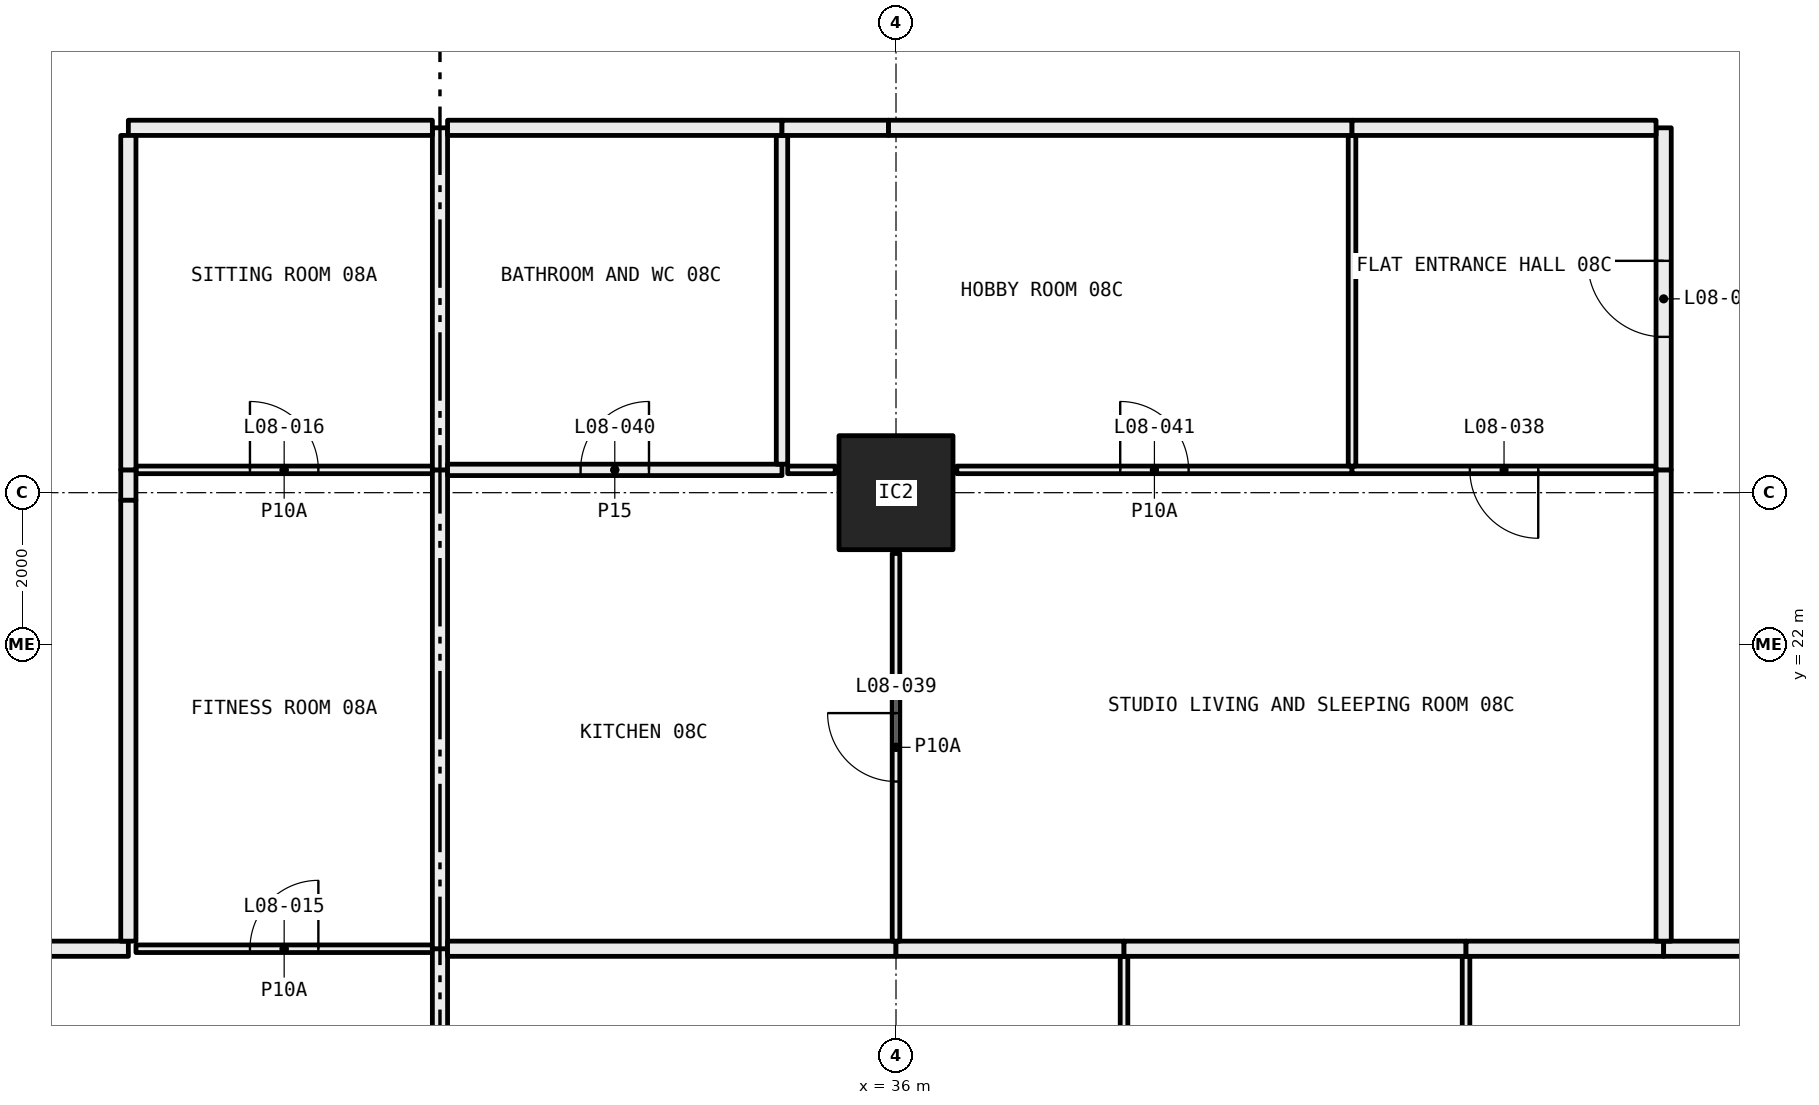
"""IFC4 building model, lengths in metres.
Left out: names, types, materials, properties, quantities, classifications, styles, units other than length and angle.
Written with IfcOpenShell. Run it as: python <this file> out.ifc"""

import sys

from ifc_helpers import new_model, si_unit, direction, frame, frame_2d, origin, origin_2d, place, context, subcontext, project, spatial, rectangle, hollow_rectangle, extrude, element, fill, save


model = new_model("IFC4")
c1 = context("Model", 3, precision=1e-05, world=origin(), true_north=direction((0.0, 1.0)))
c2 = subcontext(c1, "Body", "Model", "MODEL_VIEW")
j1 = project(units=[si_unit("LENGTHUNIT", "METRE"), si_unit("PLANEANGLEUNIT", "RADIAN")], contexts=[c1])
p1 = place(None, origin())
s1 = spatial("IfcSite", under=j1, at=p1, CompositionType="ELEMENT")
p2 = place(p1, origin())
s2 = spatial("IfcBuilding", under=s1, at=p2, CompositionType="ELEMENT")
p3 = place(p2, frame((0.0, 0.0, 40.35)))
s3 = spatial("IfcBuildingStorey", under=s2, at=p3, CompositionType="ELEMENT", Elevation=40.35)
p4 = place(p3, frame((36.0, 24.0, 0.0), z_axis=(0.0, 0.0, 1.0), x_axis=(1.0, 0.0, 0.0)))
e1 = element("IfcColumn", 1, at=p4, inside=s3, PredefinedType="COLUMN", context=c2, shape_type="SweptSolid", body=[
    extrude(hollow_rectangle(XDim=1.5, YDim=1.5, WallThickness=0.065, at=origin_2d()), origin(), (0.0, 0.0, 1.0), 3.05),
])
p5 = place(p3, frame((29.9, 18.0, 0.0), z_axis=(0.0, 0.0, 1.0), x_axis=(-1.0, 0.0, 0.0)))
e2 = element("IfcWall", 2, at=p5, inside=s3, PredefinedType="PARTITIONING", context=c2, shape_type="SweptSolid", body=[
    extrude(rectangle(XDim=3.9, YDim=0.1, at=frame_2d((1.95, 0.0))), origin(), (0.0, 0.0, 1.0), 3.05),
])
p6 = place(p5, frame((1.5, 0.0, 0.0)))
e3 = element("IfcOpeningElement", 3, at=p6, cuts=e2, PredefinedType="OPENING", context=c2, shape_type="SweptSolid", body=[
    extrude(rectangle(XDim=0.9, YDim=2.1, at=frame_2d((0.45, 1.05))), frame((0.0, 0.06, 0.0), z_axis=(0.0, -1.0, 0.0), x_axis=(1.0, 0.0, 0.0)), (0.0, 0.0, 1.0), 0.12),
])
p7 = place(p3, frame((30.0, 12.0, 0.0), z_axis=(0.0, 0.0, 1.0), x_axis=(0.0, 1.0, 0.0)))
e4 = element("IfcWall", 4, at=p7, inside=s3, PredefinedType="PARTITIONING", context=c2, shape_type="SweptSolid", body=[
    extrude(rectangle(XDim=6.0, YDim=0.2, at=frame_2d((3.0, 0.0))), origin(), (0.0, 0.0, 1.0), 2.45),
])
p8 = place(p3, frame((25.9, 18.0, 0.0), z_axis=(0.0, 0.0, 1.0), x_axis=(-1.0, 0.0, 0.0)))
e5 = element("IfcWall", 5, at=p8, inside=s3, PredefinedType="PARTITIONING", context=c2, shape_type="SweptSolid", body=[
    extrude(rectangle(XDim=1.9, YDim=0.2, at=frame_2d((0.95, 0.0))), origin(), (0.0, 0.0, 1.0), 3.05),
])
p9 = place(p3, frame((29.9, 24.3, 0.0), z_axis=(0.0, 0.0, 1.0), x_axis=(-1.0, 0.0, 0.0)))
e6 = element("IfcWall", 6, at=p9, inside=s3, PredefinedType="PARTITIONING", context=c2, shape_type="SweptSolid", body=[
    extrude(rectangle(XDim=3.9, YDim=0.1, at=frame_2d((1.95, 0.0))), origin(), (0.0, 0.0, 1.0), 3.05),
])
p10 = place(p9, frame((1.5, 0.0, 0.0)))
e7 = element("IfcOpeningElement", 7, at=p10, cuts=e6, PredefinedType="OPENING", context=c2, shape_type="SweptSolid", body=[
    extrude(rectangle(XDim=0.9, YDim=2.1, at=frame_2d((0.45, 1.05))), frame((0.0, 0.06, 0.0), z_axis=(0.0, -1.0, 0.0), x_axis=(1.0, 0.0, 0.0)), (0.0, 0.0, 1.0), 0.12),
])
p11 = place(p3, frame((30.0, 18.0, 0.0), z_axis=(0.0, 0.0, 1.0), x_axis=(0.0, 1.0, 0.0)))
e8 = element("IfcWall", 8, at=p11, inside=s3, PredefinedType="PARTITIONING", context=c2, shape_type="SweptSolid", body=[
    extrude(rectangle(XDim=6.3, YDim=0.2, at=frame_2d((3.15, 0.0))), origin(), (0.0, 0.0, 1.0), 2.45),
])
p12 = place(p3, frame((25.9, 24.3, 0.0), z_axis=(0.0, 0.0, 1.0), x_axis=(0.0, -1.0, 0.0)))
e9 = element("IfcWall", 9, at=p12, inside=s3, PredefinedType="PARTITIONING", context=c2, shape_type="SweptSolid", body=[
    extrude(rectangle(XDim=0.4, YDim=0.2, at=frame_2d((0.2, 0.0))), origin(), (0.0, 0.0, 1.0), 2.45),
])
p13 = place(p3, frame((25.9, 23.9, 0.0), z_axis=(0.0, 0.0, 1.0), x_axis=(0.0, -1.0, 0.0)))
e10 = element("IfcWall", 10, at=p13, inside=s3, PredefinedType="PARTITIONING", context=c2, shape_type="SweptSolid", body=[
    extrude(rectangle(XDim=5.8, YDim=0.2, at=frame_2d((2.9, 0.0))), origin(), (0.0, 0.0, 1.0), 3.05),
])
p14 = place(p3, frame((30.0, 24.3, 0.0), z_axis=(0.0, 0.0, 1.0), x_axis=(0.0, 1.0, 0.0)))
e11 = element("IfcWall", 11, at=p14, inside=s3, PredefinedType="PARTITIONING", context=c2, shape_type="SweptSolid", body=[
    extrude(rectangle(XDim=4.5, YDim=0.2, at=frame_2d((2.25, 0.0))), origin(), (0.0, 0.0, 1.0), 3.05),
])
p15 = place(p3, frame((29.9, 28.8, 0.0), z_axis=(0.0, 0.0, 1.0), x_axis=(-1.0, 0.0, 0.0)))
e12 = element("IfcWall", 12, at=p15, inside=s3, PredefinedType="PARTITIONING", context=c2, shape_type="SweptSolid", body=[
    extrude(rectangle(XDim=4.0, YDim=0.2, at=frame_2d((2.0, 0.0))), origin(), (0.0, 0.0, 1.0), 3.05),
])
p16 = place(p3, frame((25.9, 28.7, 0.0), z_axis=(0.0, 0.0, 1.0), x_axis=(0.0, -1.0, 0.0)))
e13 = element("IfcWall", 13, at=p16, inside=s3, PredefinedType="PARTITIONING", context=c2, shape_type="SweptSolid", body=[
    extrude(rectangle(XDim=4.4, YDim=0.2, at=frame_2d((2.2, 0.0))), origin(), (0.0, 0.0, 1.0), 3.05),
])
p17 = place(p3, frame((39.0, 12.05, 0.0), z_axis=(0.0, 0.0, 1.0), x_axis=(0.0, 1.0, 0.0)))
e14 = element("IfcWall", 14, at=p17, inside=s3, PredefinedType="PARTITIONING", context=c2, shape_type="SweptSolid", body=[
    extrude(rectangle(XDim=5.85, YDim=0.1, at=frame_2d((2.925, 0.0))), origin(), (0.0, 0.0, 1.0), 2.45),
])
p18 = place(p3, frame((36.0, 18.0, 0.0), z_axis=(0.0, 0.0, 1.0), x_axis=(-1.0, 0.0, 0.0)))
e15 = element("IfcWall", 15, at=p18, inside=s3, PredefinedType="PARTITIONING", context=c2, shape_type="SweptSolid", body=[
    extrude(rectangle(XDim=5.9, YDim=0.2, at=frame_2d((2.95, 0.0))), origin(), (0.0, 0.0, 1.0), 2.45),
])
p19 = place(p3, frame((39.0, 18.0, 0.0), z_axis=(0.0, 0.0, 1.0), x_axis=(-1.0, 0.0, 0.0)))
e16 = element("IfcWall", 16, at=p19, inside=s3, PredefinedType="PARTITIONING", context=c2, shape_type="SweptSolid", body=[
    extrude(rectangle(XDim=3.0, YDim=0.2, at=frame_2d((1.5, 0.0))), origin(), (0.0, 0.0, 1.0), 2.45),
])
p20 = place(p3, frame((43.5, 12.05, 0.0), z_axis=(0.0, 0.0, 1.0), x_axis=(0.0, 1.0, 0.0)))
e17 = element("IfcWall", 17, at=p20, inside=s3, PredefinedType="PARTITIONING", context=c2, shape_type="SweptSolid", body=[
    extrude(rectangle(XDim=5.85, YDim=0.1, at=frame_2d((2.925, 0.0))), origin(), (0.0, 0.0, 1.0), 2.45),
])
p21 = place(p3, frame((43.5, 18.0, 0.0), z_axis=(0.0, 0.0, 1.0), x_axis=(-1.0, 0.0, 0.0)))
e18 = element("IfcWall", 18, at=p21, inside=s3, PredefinedType="PARTITIONING", context=c2, shape_type="SweptSolid", body=[
    extrude(rectangle(XDim=4.5, YDim=0.2, at=frame_2d((2.25, 0.0))), origin(), (0.0, 0.0, 1.0), 3.05),
])
p22 = place(p3, frame((46.1, 18.0, 0.0), z_axis=(0.0, 0.0, 1.0), x_axis=(-1.0, 0.0, 0.0)))
e19 = element("IfcWall", 19, at=p22, inside=s3, PredefinedType="PARTITIONING", context=c2, shape_type="SweptSolid", body=[
    extrude(rectangle(XDim=2.6, YDim=0.2, at=frame_2d((1.3, 0.0))), origin(), (0.0, 0.0, 1.0), 3.05),
])
p23 = place(p3, frame((48.0, 18.0, 0.0), z_axis=(0.0, 0.0, 1.0), x_axis=(-1.0, 0.0, 0.0)))
e20 = element("IfcWall", 20, at=p23, inside=s3, PredefinedType="PARTITIONING", context=c2, shape_type="SweptSolid", body=[
    extrude(rectangle(XDim=1.9, YDim=0.2, at=frame_2d((0.95, 0.0))), origin(), (0.0, 0.0, 1.0), 3.05),
])
p24 = place(p3, frame((36.0, 18.1, 0.0), z_axis=(0.0, 0.0, 1.0), x_axis=(0.0, 1.0, 0.0)))
e21 = element("IfcWall", 21, at=p24, inside=s3, PredefinedType="PARTITIONING", context=c2, shape_type="SweptSolid", body=[
    extrude(rectangle(XDim=5.1, YDim=0.1, at=frame_2d((2.55, 0.0))), origin(), (0.0, 0.0, 1.0), 2.45),
])
p25 = place(p24, frame((2.1, 0.0, 0.0)))
e22 = element("IfcOpeningElement", 22, at=p25, cuts=e21, PredefinedType="OPENING", context=c2, shape_type="SweptSolid", body=[
    extrude(rectangle(XDim=0.9, YDim=2.1, at=frame_2d((0.45, 1.05))), frame((0.0, 0.06, 0.0), z_axis=(0.0, -1.0, 0.0), x_axis=(1.0, 0.0, 0.0)), (0.0, 0.0, 1.0), 0.12),
])
p26 = place(p3, frame((34.5, 24.3, 0.0), z_axis=(0.0, 0.0, 1.0), x_axis=(-1.0, 0.0, 0.0)))
e23 = element("IfcWall", 23, at=p26, inside=s3, PredefinedType="PARTITIONING", context=c2, shape_type="SweptSolid", body=[
    extrude(rectangle(XDim=4.4, YDim=0.15, at=frame_2d((2.2, 0.0))), origin(), (0.0, 0.0, 1.0), 3.05),
])
p27 = place(p26, frame((1.75, 0.0, 0.0)))
e24 = element("IfcOpeningElement", 24, at=p27, cuts=e23, PredefinedType="OPENING", context=c2, shape_type="SweptSolid", body=[
    extrude(rectangle(XDim=0.9, YDim=2.1, at=frame_2d((0.45, 1.05))), frame((0.0, 0.085, 0.0), z_axis=(0.0, -1.0, 0.0), x_axis=(1.0, 0.0, 0.0)), (0.0, 0.0, 1.0), 0.17),
])
p28 = place(p3, frame((35.2, 24.3, 0.0), z_axis=(0.0, 0.0, 1.0), x_axis=(-1.0, 0.0, 0.0)))
e25 = element("IfcWall", 25, at=p28, inside=s3, PredefinedType="PARTITIONING", context=c2, shape_type="SweptSolid", body=[
    extrude(rectangle(XDim=0.625, YDim=0.1, at=frame_2d((0.312, 0.0))), origin(), (0.0, 0.0, 1.0), 3.05),
])
p29 = place(p3, frame((42.0, 24.3, 0.0), z_axis=(0.0, 0.0, 1.0), x_axis=(-1.0, 0.0, 0.0)))
e26 = element("IfcWall", 26, at=p29, inside=s3, PredefinedType="PARTITIONING", context=c2, shape_type="SweptSolid", body=[
    extrude(rectangle(XDim=5.2, YDim=0.1, at=frame_2d((2.6, 0.0))), origin(), (0.0, 0.0, 1.0), 3.05),
])
p30 = place(p29, frame((2.15, 0.0, 0.0)))
e27 = element("IfcOpeningElement", 27, at=p30, cuts=e26, PredefinedType="OPENING", context=c2, shape_type="SweptSolid", body=[
    extrude(rectangle(XDim=0.9, YDim=2.1, at=frame_2d((0.45, 1.05))), frame((0.0, 0.06, 0.0), z_axis=(0.0, -1.0, 0.0), x_axis=(1.0, 0.0, 0.0)), (0.0, 0.0, 1.0), 0.12),
])
p31 = place(p3, frame((46.0, 24.3, 0.0), z_axis=(0.0, 0.0, 1.0), x_axis=(-1.0, 0.0, 0.0)))
e28 = element("IfcWall", 28, at=p31, inside=s3, PredefinedType="PARTITIONING", context=c2, shape_type="SweptSolid", body=[
    extrude(rectangle(XDim=4.0, YDim=0.1, at=frame_2d((2.0, 0.0))), origin(), (0.0, 0.0, 1.0), 3.05),
])
p32 = place(p31, frame((1.55, 0.0, 0.0)))
e29 = element("IfcOpeningElement", 29, at=p32, cuts=e28, PredefinedType="OPENING", context=c2, shape_type="SweptSolid", body=[
    extrude(rectangle(XDim=0.9, YDim=2.1, at=frame_2d((0.45, 1.05))), frame((0.0, 0.06, 0.0), z_axis=(0.0, -1.0, 0.0), x_axis=(1.0, 0.0, 0.0)), (0.0, 0.0, 1.0), 0.12),
])
p33 = place(p3, frame((46.1, 18.1, 0.0), z_axis=(0.0, 0.0, 1.0), x_axis=(0.0, 1.0, 0.0)))
e30 = element("IfcWall", 30, at=p33, inside=s3, PredefinedType="PARTITIONING", context=c2, shape_type="SweptSolid", body=[
    extrude(rectangle(XDim=6.2, YDim=0.2, at=frame_2d((3.1, 0.0))), origin(), (0.0, 0.0, 1.0), 2.45),
])
p34 = place(p3, frame((34.5, 24.375, 0.0), z_axis=(0.0, 0.0, 1.0), x_axis=(0.0, 1.0, 0.0)))
e31 = element("IfcWall", 31, at=p34, inside=s3, PredefinedType="PARTITIONING", context=c2, shape_type="SweptSolid", body=[
    extrude(rectangle(XDim=4.325, YDim=0.15, at=frame_2d((2.163, 0.0))), origin(), (0.0, 0.0, 1.0), 3.05),
])
p35 = place(p3, frame((34.5, 28.8, 0.0), z_axis=(0.0, 0.0, 1.0), x_axis=(-1.0, 0.0, 0.0)))
e32 = element("IfcWall", 32, at=p35, inside=s3, PredefinedType="PARTITIONING", context=c2, shape_type="SweptSolid", body=[
    extrude(rectangle(XDim=4.4, YDim=0.2, at=frame_2d((2.2, 0.0))), origin(), (0.0, 0.0, 1.0), 3.05),
])
p36 = place(p3, frame((42.0, 24.35, 0.0), z_axis=(0.0, 0.0, 1.0), x_axis=(0.0, 1.0, 0.0)))
e33 = element("IfcWall", 33, at=p36, inside=s3, PredefinedType="PARTITIONING", context=c2, shape_type="SweptSolid", body=[
    extrude(rectangle(XDim=4.35, YDim=0.1, at=frame_2d((2.175, 0.0))), origin(), (0.0, 0.0, 1.0), 3.05),
])
p37 = place(p3, frame((42.0, 28.8, 0.0), z_axis=(0.0, 0.0, 1.0), x_axis=(-1.0, 0.0, 0.0)))
e34 = element("IfcWall", 34, at=p37, inside=s3, PredefinedType="PARTITIONING", context=c2, shape_type="SweptSolid", body=[
    extrude(rectangle(XDim=6.1, YDim=0.2, at=frame_2d((3.05, 0.0))), origin(), (0.0, 0.0, 1.0), 2.45),
])
p38 = place(p3, frame((35.9, 28.8, 0.0), z_axis=(0.0, 0.0, 1.0), x_axis=(-1.0, 0.0, 0.0)))
e35 = element("IfcWall", 35, at=p38, inside=s3, PredefinedType="PARTITIONING", context=c2, shape_type="SweptSolid", body=[
    extrude(rectangle(XDim=1.4, YDim=0.2, at=frame_2d((0.7, 0.0))), origin(), (0.0, 0.0, 1.0), 3.05),
])
p39 = place(p3, frame((46.1, 24.3, 0.0), z_axis=(0.0, 0.0, 1.0), x_axis=(0.0, 1.0, 0.0)))
e36 = element("IfcWall", 36, at=p39, inside=s3, PredefinedType="PARTITIONING", context=c2, shape_type="SweptSolid", body=[
    extrude(rectangle(XDim=4.5, YDim=0.2, at=frame_2d((2.25, 0.0))), origin(), (0.0, 0.0, 1.0), 3.05),
])
p40 = place(p39, frame((1.75, 0.0, 0.0)))
e37 = element("IfcOpeningElement", 37, at=p40, cuts=e36, PredefinedType="OPENING", context=c2, shape_type="SweptSolid", body=[
    extrude(rectangle(XDim=1.0, YDim=2.1, at=frame_2d((0.5, 1.05))), frame((0.0, 0.11, 0.0), z_axis=(0.0, -1.0, 0.0), x_axis=(1.0, 0.0, 0.0)), (0.0, 0.0, 1.0), 0.22),
])
p41 = place(p3, frame((46.0, 28.8, 0.0), z_axis=(0.0, 0.0, 1.0), x_axis=(-1.0, 0.0, 0.0)))
e38 = element("IfcWall", 38, at=p41, inside=s3, PredefinedType="PARTITIONING", context=c2, shape_type="SweptSolid", body=[
    extrude(rectangle(XDim=4.0, YDim=0.2, at=frame_2d((2.0, 0.0))), origin(), (0.0, 0.0, 1.0), 3.05),
])
p42 = place(p6, frame((0.9, 0.0, 0.0), x_axis=(-1.0, 0.0, 0.0)))
e39 = element("IfcDoor", 39, at=p42, inside=s3, OperationType="SINGLE_SWING_LEFT", PredefinedType="DOOR", context=c2, shape_type="SweptSolid", body=[
    extrude(rectangle(XDim=0.9, YDim=2.1, at=frame_2d((0.45, 1.05))), frame((0.0, 0.025, 0.0), z_axis=(0.0, -1.0, 0.0), x_axis=(1.0, 0.0, 0.0)), (0.0, 0.0, 1.0), 0.05),
])
fill(e3, e39)
p43 = place(p10, frame((0.9, 0.0, 0.0), x_axis=(-1.0, 0.0, 0.0)))
e40 = element("IfcDoor", 40, at=p43, inside=s3, OperationType="SINGLE_SWING_RIGHT", PredefinedType="DOOR", context=c2, shape_type="SweptSolid", body=[
    extrude(rectangle(XDim=0.9, YDim=2.1, at=frame_2d((0.45, 1.05))), frame((0.0, 0.025, 0.0), z_axis=(0.0, -1.0, 0.0), x_axis=(1.0, 0.0, 0.0)), (0.0, 0.0, 1.0), 0.05),
])
fill(e7, e40)
p44 = place(p40, origin())
e41 = element("IfcDoor", 41, at=p44, inside=s3, OperationType="SINGLE_SWING_LEFT", PredefinedType="DOOR", context=c2, shape_type="SweptSolid", body=[
    extrude(rectangle(XDim=1.0, YDim=2.1, at=frame_2d((0.5, 1.05))), frame((0.0, 0.025, 0.0), z_axis=(0.0, -1.0, 0.0), x_axis=(1.0, 0.0, 0.0)), (0.0, 0.0, 1.0), 0.05),
])
fill(e37, e41)
p45 = place(p32, origin())
e42 = element("IfcDoor", 42, at=p45, inside=s3, OperationType="SINGLE_SWING_RIGHT", PredefinedType="DOOR", context=c2, shape_type="SweptSolid", body=[
    extrude(rectangle(XDim=0.9, YDim=2.1, at=frame_2d((0.45, 1.05))), frame((0.0, 0.025, 0.0), z_axis=(0.0, -1.0, 0.0), x_axis=(1.0, 0.0, 0.0)), (0.0, 0.0, 1.0), 0.05),
])
fill(e29, e42)
p46 = place(p25, origin())
e43 = element("IfcDoor", 43, at=p46, inside=s3, OperationType="SINGLE_SWING_LEFT", PredefinedType="DOOR", context=c2, shape_type="SweptSolid", body=[
    extrude(rectangle(XDim=0.9, YDim=2.1, at=frame_2d((0.45, 1.05))), frame((0.0, 0.025, 0.0), z_axis=(0.0, -1.0, 0.0), x_axis=(1.0, 0.0, 0.0)), (0.0, 0.0, 1.0), 0.05),
])
fill(e22, e43)
p47 = place(p27, frame((0.9, 0.0, 0.0), x_axis=(-1.0, 0.0, 0.0)))
e44 = element("IfcDoor", 44, at=p47, inside=s3, OperationType="SINGLE_SWING_LEFT", PredefinedType="DOOR", context=c2, shape_type="SweptSolid", body=[
    extrude(rectangle(XDim=0.9, YDim=2.1, at=frame_2d((0.45, 1.05))), frame((0.0, 0.025, 0.0), z_axis=(0.0, -1.0, 0.0), x_axis=(1.0, 0.0, 0.0)), (0.0, 0.0, 1.0), 0.05),
])
fill(e24, e44)
p48 = place(p30, frame((0.9, 0.0, 0.0), x_axis=(-1.0, 0.0, 0.0)))
e45 = element("IfcDoor", 45, at=p48, inside=s3, OperationType="SINGLE_SWING_RIGHT", PredefinedType="DOOR", context=c2, shape_type="SweptSolid", body=[
    extrude(rectangle(XDim=0.9, YDim=2.1, at=frame_2d((0.45, 1.05))), frame((0.0, 0.025, 0.0), z_axis=(0.0, -1.0, 0.0), x_axis=(1.0, 0.0, 0.0)), (0.0, 0.0, 1.0), 0.05),
])
fill(e27, e45)
save(model, sys.argv[1])
